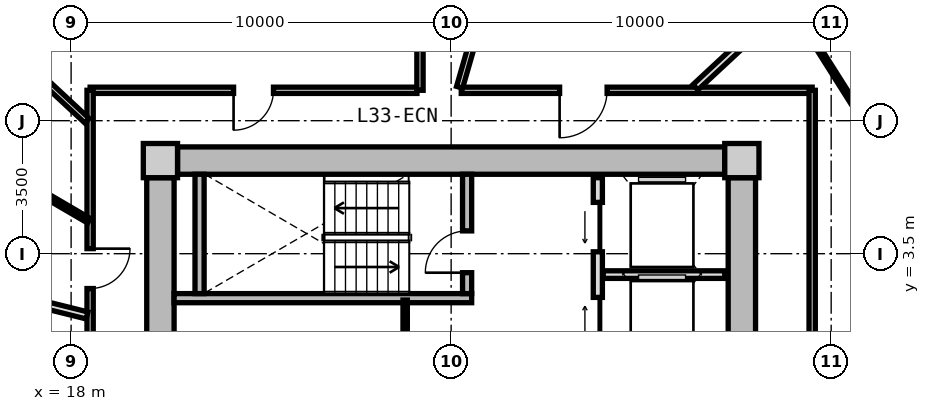
"""IFC4 building model, lengths in metres.
Left out: names, types, materials, properties, quantities, classifications, styles, units other than length and angle.
Written with IfcOpenShell. Run it as: python <this file> out.ifc"""

import sys

from ifc_helpers import new_model, si_unit, direction, frame, frame_2d, origin, origin_2d, place, context, subcontext, project, spatial, rectangle, extrude, source, transform, mapped, element, fill, save


model = new_model("IFC4")
c1 = context("Model", 3, precision=1e-05, world=origin(), true_north=direction((0.0, 1.0)))
c2 = subcontext(c1, "Body", "Model", "MODEL_VIEW")
j1 = project(units=[si_unit("LENGTHUNIT", "METRE"), si_unit("PLANEANGLEUNIT", "RADIAN")], contexts=[c1])
p1 = place(None, origin())
s1 = spatial("IfcSite", under=j1, at=p1, CompositionType="ELEMENT")
p2 = place(p1, origin())
s2 = spatial("IfcBuilding", under=s1, at=p2, CompositionType="ELEMENT")
p3 = place(p2, frame((0.0, 0.0, 108.45)))
s3 = spatial("IfcBuildingStorey", under=s2, at=p3, CompositionType="ELEMENT", Elevation=108.45)
m1 = source(origin(), c2, "Body", "SweptSolid", [
    extrude(rectangle(XDim=0.9, YDim=0.9, at=origin_2d()), origin(), (0.0, 0.0, 1.0), 3.05),
])
for number, where, z_axis, x_axis in (
    (1, (35.65, 5.95, 0.0), (0.0, 0.0, 1.0), (1.0, 0.0, 0.0)),
    (2, (20.35, 5.95, 0.0), (0.0, 0.0, 1.0), (1.0, 0.0, 0.0)),
):
    element("IfcColumn", number, at=place(p3, frame(where, z_axis=z_axis, x_axis=x_axis)), inside=s3, PredefinedType="COLUMN", context=c2, shape_type="MappedRepresentation", body=[
        mapped(m1, transform((0.0, 0.0, 0.0), x_axis=(1.0, 0.0, 0.0), y_axis=(0.0, 1.0, 0.0), z_axis=(0.0, 0.0, 1.0), scale=1.0)),
    ])
m2 = source(origin(), c2, "Body", "SweptSolid", [
    extrude(rectangle(XDim=14.4, YDim=0.72, at=frame_2d((7.2, 0.0))), origin(), (0.0, 0.0, 1.0), 2.79),
])
p4 = place(p3, frame((20.8, 5.95, 0.0), z_axis=(0.0, 0.0, 1.0), x_axis=(1.0, 0.0, 0.0)))
e3 = element("IfcWall", 3, at=p4, inside=s3, PredefinedType="SHEAR", context=c2, shape_type="MappedRepresentation", body=[
    mapped(m2, transform((0.0, 0.0, 0.0), x_axis=(1.0, 0.0, 0.0), y_axis=(0.0, 1.0, 0.0), z_axis=(0.0, 0.0, 1.0), scale=1.0)),
])
m3 = source(origin(), c2, "Body", "SweptSolid", [
    extrude(rectangle(XDim=11.0, YDim=0.72, at=frame_2d((5.5, 0.0))), origin(), (0.0, 0.0, 1.0), 2.79),
])
p5 = place(p3, frame((20.35, -5.5, 0.0), z_axis=(0.0, 0.0, 1.0), x_axis=(0.0, 1.0, 0.0)))
e4 = element("IfcWall", 4, at=p5, inside=s3, PredefinedType="SHEAR", context=c2, shape_type="MappedRepresentation", body=[
    mapped(m3, transform((0.0, 0.0, 0.0), x_axis=(1.0, 0.0, 0.0), y_axis=(0.0, 1.0, 0.0), z_axis=(0.0, 0.0, 1.0), scale=1.0)),
])
p6 = place(p5, frame((3.8, 0.0, 0.0)))
e5 = element("IfcOpeningElement", 5, at=p6, cuts=e4, PredefinedType="OPENING", context=c2, shape_type="SweptSolid", body=[
    extrude(rectangle(XDim=1.2, YDim=2.15, at=frame_2d((0.6, 1.075))), frame((0.0, 0.37, 0.0), z_axis=(0.0, -1.0, 0.0), x_axis=(1.0, 0.0, 0.0)), (0.0, 0.0, 1.0), 0.74),
])
p7 = place(p3, frame((35.65, 5.5, 0.0), z_axis=(0.0, 0.0, 1.0), x_axis=(0.0, -1.0, 0.0)))
e6 = element("IfcWall", 6, at=p7, inside=s3, PredefinedType="SHEAR", context=c2, shape_type="MappedRepresentation", body=[
    mapped(m3, transform((0.0, 0.0, 0.0), x_axis=(1.0, 0.0, 0.0), y_axis=(0.0, 1.0, 0.0), z_axis=(0.0, 0.0, 1.0), scale=1.0)),
])
p8 = place(p7, frame((5.65, 0.0, 0.0)))
e7 = element("IfcOpeningElement", 7, at=p8, cuts=e6, PredefinedType="OPENING", context=c2, shape_type="SweptSolid", body=[
    extrude(rectangle(XDim=1.2, YDim=2.15, at=frame_2d((0.6, 1.075))), frame((0.0, 0.37, 0.0), z_axis=(0.0, -1.0, 0.0), x_axis=(1.0, 0.0, 0.0)), (0.0, 0.0, 1.0), 0.74),
])
m4 = source(origin(), c2, "Body", "SweptSolid", [
    extrude(rectangle(XDim=7.83, YDim=0.24, at=frame_2d((3.915, 0.0))), origin(), (0.0, 0.0, 1.0), 2.79),
])
p9 = place(p3, frame((20.71, 2.33, 0.0), z_axis=(0.0, 0.0, 1.0), x_axis=(1.0, 0.0, 0.0)))
e8 = element("IfcWall", 8, at=p9, inside=s3, PredefinedType="PARTITIONING", context=c2, shape_type="MappedRepresentation", body=[
    mapped(m4, transform((0.0, 0.0, 0.0), x_axis=(1.0, 0.0, 0.0), y_axis=(0.0, 1.0, 0.0), z_axis=(0.0, 0.0, 1.0), scale=1.0)),
])
m5 = source(origin(), c2, "Body", "SweptSolid", [
    extrude(rectangle(XDim=3.14, YDim=0.24, at=frame_2d((1.57, 0.0))), origin(), (0.0, 0.0, 1.0), 2.79),
])
p10 = place(p3, frame((21.38, 2.45, 0.0), z_axis=(0.0, 0.0, 1.0), x_axis=(0.0, 1.0, 0.0)))
e9 = element("IfcWall", 9, at=p10, inside=s3, PredefinedType="PARTITIONING", context=c2, shape_type="MappedRepresentation", body=[
    mapped(m5, transform((0.0, 0.0, 0.0), x_axis=(1.0, 0.0, 0.0), y_axis=(0.0, 1.0, 0.0), z_axis=(0.0, 0.0, 1.0), scale=1.0)),
])
p11 = place(p3, frame((28.42, 2.45, 0.0), z_axis=(0.0, 0.0, 1.0), x_axis=(0.0, 1.0, 0.0)))
e10 = element("IfcWall", 10, at=p11, inside=s3, PredefinedType="PARTITIONING", context=c2, shape_type="MappedRepresentation", body=[
    mapped(m5, transform((0.0, 0.0, 0.0), x_axis=(1.0, 0.0, 0.0), y_axis=(0.0, 1.0, 0.0), z_axis=(0.0, 0.0, 1.0), scale=1.0)),
])
p12 = place(p11, frame((0.55, 0.0, 0.0)))
e11 = element("IfcOpeningElement", 11, at=p12, cuts=e10, PredefinedType="OPENING", context=c2, shape_type="SweptSolid", body=[
    extrude(rectangle(XDim=1.1, YDim=2.15, at=frame_2d((0.55, 1.075))), frame((0.0, 0.13, 0.0), z_axis=(0.0, -1.0, 0.0), x_axis=(1.0, 0.0, 0.0)), (0.0, 0.0, 1.0), 0.26),
])
m6 = source(origin(), c2, "Body", "SweptSolid", [
    extrude(rectangle(XDim=5.0, YDim=0.24, at=frame_2d((2.5, 0.0))), origin(), (0.0, 0.0, 1.0), 2.775),
])
p13 = place(p3, frame((31.86, 0.5, 0.0), z_axis=(0.0, 0.0, 1.0), x_axis=(0.0, 1.0, 0.0)))
e12 = element("IfcWall", 12, at=p13, inside=s3, PredefinedType="PARTITIONING", context=c2, shape_type="MappedRepresentation", body=[
    mapped(m6, transform((0.0, 0.0, 0.0), x_axis=(1.0, 0.0, 0.0), y_axis=(0.0, 1.0, 0.0), z_axis=(0.0, 0.0, 1.0), scale=1.0)),
])
p14 = place(p13, frame((3.05, 0.0, 0.0)))
e13 = element("IfcOpeningElement", 13, at=p14, cuts=e12, PredefinedType="OPENING", context=c2, shape_type="SweptSolid", body=[
    extrude(rectangle(XDim=1.3, YDim=2.2, at=frame_2d((0.65, 1.1))), frame((0.0, 0.13, 0.0), z_axis=(0.0, -1.0, 0.0), x_axis=(1.0, 0.0, 0.0)), (0.0, 0.0, 1.0), 0.26),
])
p15 = place(p13, frame((0.55, 0.0, 0.0)))
e14 = element("IfcOpeningElement", 14, at=p15, cuts=e12, PredefinedType="OPENING", context=c2, shape_type="SweptSolid", body=[
    extrude(rectangle(XDim=1.3, YDim=2.2, at=frame_2d((0.65, 1.1))), frame((0.0, 0.13, 0.0), z_axis=(0.0, -1.0, 0.0), x_axis=(1.0, 0.0, 0.0)), (0.0, 0.0, 1.0), 0.26),
])
m7 = source(origin(), c2, "Body", "SweptSolid", [
    extrude(rectangle(XDim=3.2, YDim=0.2, at=frame_2d((1.6, 0.0))), origin(), (0.0, 0.0, 1.0), 2.775),
])
p16 = place(p3, frame((32.0, 2.95, 0.0), z_axis=(0.0, 0.0, 1.0), x_axis=(1.0, 0.0, 0.0)))
e15 = element("IfcWall", 15, at=p16, inside=s3, PredefinedType="PARTITIONING", context=c2, shape_type="MappedRepresentation", body=[
    mapped(m7, transform((0.0, 0.0, 0.0), x_axis=(1.0, 0.0, 0.0), y_axis=(0.0, 1.0, 0.0), z_axis=(0.0, 0.0, 1.0), scale=1.0)),
])
m8 = source(origin(), c2, "Body", "SweptSolid", [
    extrude(rectangle(XDim=2.33, YDim=0.115, at=frame_2d((1.165, 0.0))), origin(), (0.0, 0.0, 1.0), 2.775),
])
p17 = place(p3, frame((26.79, -0.05, 0.0), z_axis=(0.0, 0.0, 1.0), x_axis=(0.0, 1.0, 0.0)))
e16 = element("IfcWall", 16, at=p17, inside=s3, PredefinedType="PARTITIONING", context=c2, shape_type="MappedRepresentation", body=[
    mapped(m8, transform((0.0, 0.0, 0.0), x_axis=(1.0, 0.0, 0.0), y_axis=(0.0, 1.0, 0.0), z_axis=(0.0, 0.0, 1.0), scale=1.0)),
])
m9 = source(origin(), c2, "Body", "SweptSolid", [
    extrude(rectangle(XDim=8.6, YDim=0.165, at=frame_2d((4.3, 0.0))), origin(), (0.0, 0.0, 1.0), 2.775),
])
p18 = place(p3, frame((18.5, 7.8, 0.0), z_axis=(0.0, 0.0, 1.0), x_axis=(1.0, 0.0, 0.0)))
e17 = element("IfcWall", 17, at=p18, inside=s3, PredefinedType="PARTITIONING", context=c2, shape_type="MappedRepresentation", body=[
    mapped(m9, transform((0.0, 0.0, 0.0), x_axis=(1.0, 0.0, 0.0), y_axis=(0.0, 1.0, 0.0), z_axis=(0.0, 0.0, 1.0), scale=1.0)),
])
p19 = place(p18, frame((3.775, 0.0, 0.0)))
e18 = element("IfcOpeningElement", 18, at=p19, cuts=e17, PredefinedType="OPENING", context=c2, shape_type="SweptSolid", body=[
    extrude(rectangle(XDim=1.05, YDim=2.15, at=frame_2d((0.525, 1.075))), frame((0.0, 0.093, 0.0), z_axis=(0.0, -1.0, 0.0), x_axis=(1.0, 0.0, 0.0)), (0.0, 0.0, 1.0), 0.185),
])
m10 = source(origin(), c2, "Body", "SweptSolid", [
    extrude(rectangle(XDim=9.234, YDim=0.165, at=frame_2d((4.617, 0.0))), origin(), (0.0, 0.0, 1.0), 2.775),
])
p20 = place(p3, frame((28.266, 7.8, 0.0), z_axis=(0.0, 0.0, 1.0), x_axis=(1.0, 0.0, 0.0)))
e19 = element("IfcWall", 19, at=p20, inside=s3, PredefinedType="PARTITIONING", context=c2, shape_type="MappedRepresentation", body=[
    mapped(m10, transform((0.0, 0.0, 0.0), x_axis=(1.0, 0.0, 0.0), y_axis=(0.0, 1.0, 0.0), z_axis=(0.0, 0.0, 1.0), scale=1.0)),
])
p21 = place(p20, frame((2.588, 0.0, 0.0)))
e20 = element("IfcOpeningElement", 20, at=p21, cuts=e19, PredefinedType="OPENING", context=c2, shape_type="SweptSolid", body=[
    extrude(rectangle(XDim=1.25, YDim=2.2, at=frame_2d((0.625, 1.1))), frame((0.0, 0.093, 0.0), z_axis=(0.0, -1.0, 0.0), x_axis=(1.0, 0.0, 0.0)), (0.0, 0.0, 1.0), 0.185),
])
m11 = source(origin(), c2, "Body", "SweptSolid", [
    extrude(rectangle(XDim=15.6, YDim=0.165, at=frame_2d((7.8, 0.0))), origin(), (0.0, 0.0, 1.0), 2.775),
])
p22 = place(p3, frame((18.5, -7.8, 0.0), z_axis=(0.0, 0.0, 1.0), x_axis=(0.0, 1.0, 0.0)))
e21 = element("IfcWall", 21, at=p22, inside=s3, PredefinedType="PARTITIONING", context=c2, shape_type="MappedRepresentation", body=[
    mapped(m11, transform((0.0, 0.0, 0.0), x_axis=(1.0, 0.0, 0.0), y_axis=(0.0, 1.0, 0.0), z_axis=(0.0, 0.0, 1.0), scale=1.0)),
])
p23 = place(p22, frame((10.383, 0.0, 0.0)))
e22 = element("IfcOpeningElement", 22, at=p23, cuts=e21, PredefinedType="OPENING", context=c2, shape_type="SweptSolid", body=[
    extrude(rectangle(XDim=1.05, YDim=2.15, at=frame_2d((0.525, 1.075))), frame((0.0, 0.093, 0.0), z_axis=(0.0, -1.0, 0.0), x_axis=(1.0, 0.0, 0.0)), (0.0, 0.0, 1.0), 0.185),
])
p24 = place(p22, frame((6.419, 0.0, 0.0)))
e23 = element("IfcOpeningElement", 23, at=p24, cuts=e21, PredefinedType="OPENING", context=c2, shape_type="SweptSolid", body=[
    extrude(rectangle(XDim=1.05, YDim=2.15, at=frame_2d((0.525, 1.075))), frame((0.0, 0.093, 0.0), z_axis=(0.0, -1.0, 0.0), x_axis=(1.0, 0.0, 0.0)), (0.0, 0.0, 1.0), 0.185),
])
p25 = place(p22, frame((1.821, 0.0, 0.0)))
e24 = element("IfcOpeningElement", 24, at=p25, cuts=e21, PredefinedType="OPENING", context=c2, shape_type="SweptSolid", body=[
    extrude(rectangle(XDim=1.05, YDim=2.15, at=frame_2d((0.525, 1.075))), frame((0.0, 0.093, 0.0), z_axis=(0.0, -1.0, 0.0), x_axis=(1.0, 0.0, 0.0)), (0.0, 0.0, 1.0), 0.185),
])
p26 = place(p3, frame((37.5, 7.8, 0.0), z_axis=(0.0, 0.0, 1.0), x_axis=(0.0, -1.0, 0.0)))
e25 = element("IfcWall", 25, at=p26, inside=s3, PredefinedType="PARTITIONING", context=c2, shape_type="MappedRepresentation", body=[
    mapped(m11, transform((0.0, 0.0, 0.0), x_axis=(1.0, 0.0, 0.0), y_axis=(0.0, 1.0, 0.0), z_axis=(0.0, 0.0, 1.0), scale=1.0)),
])
p27 = place(p26, frame((6.87, 0.0, 0.0)))
e26 = element("IfcOpeningElement", 26, at=p27, cuts=e25, PredefinedType="OPENING", context=c2, shape_type="SweptSolid", body=[
    extrude(rectangle(XDim=1.05, YDim=2.15, at=frame_2d((0.525, 1.075))), frame((0.0, 0.093, 0.0), z_axis=(0.0, -1.0, 0.0), x_axis=(1.0, 0.0, 0.0)), (0.0, 0.0, 1.0), 0.185),
])
m12 = source(origin(), c2, "Body", "SweptSolid", [
    extrude(rectangle(XDim=8.989, YDim=0.165, at=frame_2d((4.495, 0.0))), origin(), (0.0, 0.0, 1.0), 2.275),
])
p28 = place(p3, frame((28.222, 7.88, 0.0), z_axis=(0.0, 0.0, 1.0), x_axis=(0.27702323008, 0.960863221274, 0.0)))
e27 = element("IfcWall", 27, at=p28, inside=s3, PredefinedType="PARTITIONING", context=c2, shape_type="MappedRepresentation", body=[
    mapped(m12, transform((0.0, 0.0, 0.0), x_axis=(1.0, 0.0, 0.0), y_axis=(0.0, 1.0, 0.0), z_axis=(0.0, 0.0, 1.0), scale=1.0)),
])
m13 = source(origin(), c2, "Body", "SweptSolid", [
    extrude(rectangle(XDim=7.482, YDim=0.165, at=frame_2d((3.741, 0.0))), origin(), (0.0, 0.0, 1.0), 2.275),
])
p29 = place(p3, frame((18.42, 6.998, 0.0), z_axis=(0.0, 0.0, 1.0), x_axis=(-0.732508698043, 0.680757671489, 0.0)))
e28 = element("IfcWall", 28, at=p29, inside=s3, PredefinedType="PARTITIONING", context=c2, shape_type="MappedRepresentation", body=[
    mapped(m13, transform((0.0, 0.0, 0.0), x_axis=(1.0, 0.0, 0.0), y_axis=(0.0, 1.0, 0.0), z_axis=(0.0, 0.0, 1.0), scale=1.0)),
])
m14 = source(origin(), c2, "Body", "SweptSolid", [
    extrude(rectangle(XDim=7.56, YDim=0.165, at=frame_2d((3.78, 0.0))), origin(), (0.0, 0.0, 1.0), 2.775),
])
p30 = place(p3, frame((27.18, 7.8, 0.0), z_axis=(0.0, 0.0, 1.0), x_axis=(0.0, 1.0, 0.0)))
e29 = element("IfcWall", 29, at=p30, inside=s3, PredefinedType="PARTITIONING", context=c2, shape_type="MappedRepresentation", body=[
    mapped(m14, transform((0.0, 0.0, 0.0), x_axis=(1.0, 0.0, 0.0), y_axis=(0.0, 1.0, 0.0), z_axis=(0.0, 0.0, 1.0), scale=1.0)),
])
m15 = source(origin(), c2, "Body", "SweptSolid", [
    extrude(rectangle(XDim=10.556, YDim=0.19, at=frame_2d((5.278, 0.0))), origin(), (0.0, 0.0, 1.0), 2.275),
])
p31 = place(p3, frame((18.42, 1.875, 0.0), z_axis=(0.0, 0.0, 1.0), x_axis=(-0.970363857851, 0.241648470667, 0.0)))
e30 = element("IfcWall", 30, at=p31, inside=s3, PredefinedType="PARTITIONING", context=c2, shape_type="MappedRepresentation", body=[
    mapped(m15, transform((0.0, 0.0, 0.0), x_axis=(1.0, 0.0, 0.0), y_axis=(0.0, 1.0, 0.0), z_axis=(0.0, 0.0, 1.0), scale=1.0)),
])
m16 = source(origin(), c2, "Body", "SweptSolid", [
    extrude(rectangle(XDim=4.735, YDim=0.14, at=frame_2d((2.368, 0.0))), origin(), (0.0, 0.0, 1.0), 2.775),
])
p32 = place(p3, frame((18.47, 4.368, 0.0), z_axis=(0.0, 0.0, 1.0), x_axis=(-0.863537576642, 0.504284496814, 0.0)))
e31 = element("IfcWall", 31, at=p32, inside=s3, PredefinedType="PARTITIONING", context=c2, shape_type="MappedRepresentation", body=[
    mapped(m16, transform((0.0, 0.0, 0.0), x_axis=(1.0, 0.0, 0.0), y_axis=(0.0, 1.0, 0.0), z_axis=(0.0, 0.0, 1.0), scale=1.0)),
])
p33 = place(p32, frame((1.908, 0.0, 0.0)))
e32 = element("IfcOpeningElement", 32, at=p33, cuts=e31, PredefinedType="OPENING", context=c2, shape_type="SweptSolid", body=[
    extrude(rectangle(XDim=0.92, YDim=2.1, at=frame_2d((0.46, 1.05))), frame((0.0, 0.08, 0.0), z_axis=(0.0, -1.0, 0.0), x_axis=(1.0, 0.0, 0.0)), (0.0, 0.0, 1.0), 0.16),
])
m17 = source(origin(), c2, "Body", "SweptSolid", [
    extrude(rectangle(XDim=6.187, YDim=0.19, at=frame_2d((3.093, 0.0))), origin(), (0.0, 0.0, 1.0), 2.275),
])
p34 = place(p3, frame((34.429, 7.88, 0.0), z_axis=(0.0, 0.0, 1.0), x_axis=(0.732501077882, 0.680765870841, 0.0)))
e33 = element("IfcWall", 33, at=p34, inside=s3, PredefinedType="PARTITIONING", context=c2, shape_type="MappedRepresentation", body=[
    mapped(m17, transform((0.0, 0.0, 0.0), x_axis=(1.0, 0.0, 0.0), y_axis=(0.0, 1.0, 0.0), z_axis=(0.0, 0.0, 1.0), scale=1.0)),
])
m18 = source(origin(), c2, "Body", "SweptSolid", [
    extrude(rectangle(XDim=7.618, YDim=0.115, at=frame_2d((3.809, 0.0))), origin(), (0.0, 0.0, 1.0), 2.775),
])
p35 = place(p3, frame((40.923, 3.749, 0.0), z_axis=(0.0, 0.0, 1.0), x_axis=(-0.534316104929, 0.845284744931, 0.0)))
e34 = element("IfcWall", 34, at=p35, inside=s3, PredefinedType="PARTITIONING", context=c2, shape_type="MappedRepresentation", body=[
    mapped(m18, transform((0.0, 0.0, 0.0), x_axis=(1.0, 0.0, 0.0), y_axis=(0.0, 1.0, 0.0), z_axis=(0.0, 0.0, 1.0), scale=1.0)),
])
p36 = place(p35, frame((3.334, 0.0, 0.0)))
e35 = element("IfcOpeningElement", 35, at=p36, cuts=e34, PredefinedType="OPENING", context=c2, shape_type="SweptSolid", body=[
    extrude(rectangle(XDim=0.95, YDim=2.1, at=frame_2d((0.475, 1.05))), frame((0.0, 0.067, 0.0), z_axis=(0.0, -1.0, 0.0), x_axis=(1.0, 0.0, 0.0)), (0.0, 0.0, 1.0), 0.135),
])
m19 = source(origin(), c2, "Body", "SweptSolid", [
    extrude(rectangle(XDim=1.1, YDim=2.15, at=frame_2d((0.55, 1.075))), frame((0.0, 0.025, 0.0), z_axis=(0.0, -1.0, 0.0), x_axis=(1.0, 0.0, 0.0)), (0.0, 0.0, 1.0), 0.05),
])
p37 = place(p12, origin())
e36 = element("IfcDoor", 36, at=p37, inside=s3, OperationType="SINGLE_SWING_LEFT", PredefinedType="DOOR", context=c2, shape_type="MappedRepresentation", body=[
    mapped(m19, transform((0.0, 0.0, 0.0), x_axis=(1.0, 0.0, 0.0), y_axis=(0.0, 1.0, 0.0), z_axis=(0.0, 0.0, 1.0), scale=1.0)),
])
fill(e11, e36)
m20 = source(origin(), c2, "Body", "SweptSolid", [
    extrude(rectangle(XDim=1.3, YDim=2.2, at=frame_2d((0.65, 1.1))), frame((0.0, 0.025, 0.0), z_axis=(0.0, -1.0, 0.0), x_axis=(1.0, 0.0, 0.0)), (0.0, 0.0, 1.0), 0.05),
])
p38 = place(p14, origin())
e37 = element("IfcDoor", 37, at=p38, inside=s3, OperationType="SLIDING_TO_LEFT", PredefinedType="DOOR", context=c2, shape_type="MappedRepresentation", body=[
    mapped(m20, transform((0.0, 0.0, 0.0), x_axis=(1.0, 0.0, 0.0), y_axis=(0.0, 1.0, 0.0), z_axis=(0.0, 0.0, 1.0), scale=1.0)),
])
fill(e13, e37)
p39 = place(p15, origin())
e38 = element("IfcDoor", 38, at=p39, inside=s3, OperationType="SLIDING_TO_RIGHT", PredefinedType="DOOR", context=c2, shape_type="MappedRepresentation", body=[
    mapped(m20, transform((0.0, 0.0, 0.0), x_axis=(1.0, 0.0, 0.0), y_axis=(0.0, 1.0, 0.0), z_axis=(0.0, 0.0, 1.0), scale=1.0)),
])
fill(e14, e38)
m21 = source(origin(), c2, "Body", "SweptSolid", [
    extrude(rectangle(XDim=1.05, YDim=2.15, at=frame_2d((0.525, 1.075))), frame((0.0, 0.025, 0.0), z_axis=(0.0, -1.0, 0.0), x_axis=(1.0, 0.0, 0.0)), (0.0, 0.0, 1.0), 0.05),
])
p40 = place(p19, frame((1.05, 0.0, 0.0), z_axis=(0.0, 0.0, 1.0), x_axis=(-1.0, 0.0, 0.0)))
e39 = element("IfcDoor", 39, at=p40, inside=s3, OperationType="SINGLE_SWING_RIGHT", PredefinedType="DOOR", context=c2, shape_type="MappedRepresentation", body=[
    mapped(m21, transform((0.0, 0.0, 0.0), x_axis=(1.0, 0.0, 0.0), y_axis=(0.0, 1.0, 0.0), z_axis=(0.0, 0.0, 1.0), scale=1.0)),
])
fill(e18, e39)
p41 = place(p23, frame((1.05, 0.0, 0.0), z_axis=(0.0, 0.0, 1.0), x_axis=(-1.0, 0.0, 0.0)))
e40 = element("IfcDoor", 40, at=p41, inside=s3, OperationType="SINGLE_SWING_LEFT", PredefinedType="DOOR", context=c2, shape_type="MappedRepresentation", body=[
    mapped(m21, transform((0.0, 0.0, 0.0), x_axis=(1.0, 0.0, 0.0), y_axis=(0.0, 1.0, 0.0), z_axis=(0.0, 0.0, 1.0), scale=1.0)),
])
fill(e22, e40)
m22 = source(origin(), c2, "Body", "SweptSolid", [
    extrude(rectangle(XDim=1.25, YDim=2.2, at=frame_2d((0.625, 1.1))), frame((0.0, 0.025, 0.0), z_axis=(0.0, -1.0, 0.0), x_axis=(1.0, 0.0, 0.0)), (0.0, 0.0, 1.0), 0.05),
])
p42 = place(p21, frame((1.25, 0.0, 0.0), z_axis=(0.0, 0.0, 1.0), x_axis=(-1.0, 0.0, 0.0)))
e41 = element("IfcDoor", 41, at=p42, inside=s3, OperationType="SINGLE_SWING_RIGHT", PredefinedType="DOOR", context=c2, shape_type="MappedRepresentation", body=[
    mapped(m22, transform((0.0, 0.0, 0.0), x_axis=(1.0, 0.0, 0.0), y_axis=(0.0, 1.0, 0.0), z_axis=(0.0, 0.0, 1.0), scale=1.0)),
])
fill(e20, e41)
save(model, sys.argv[1])
